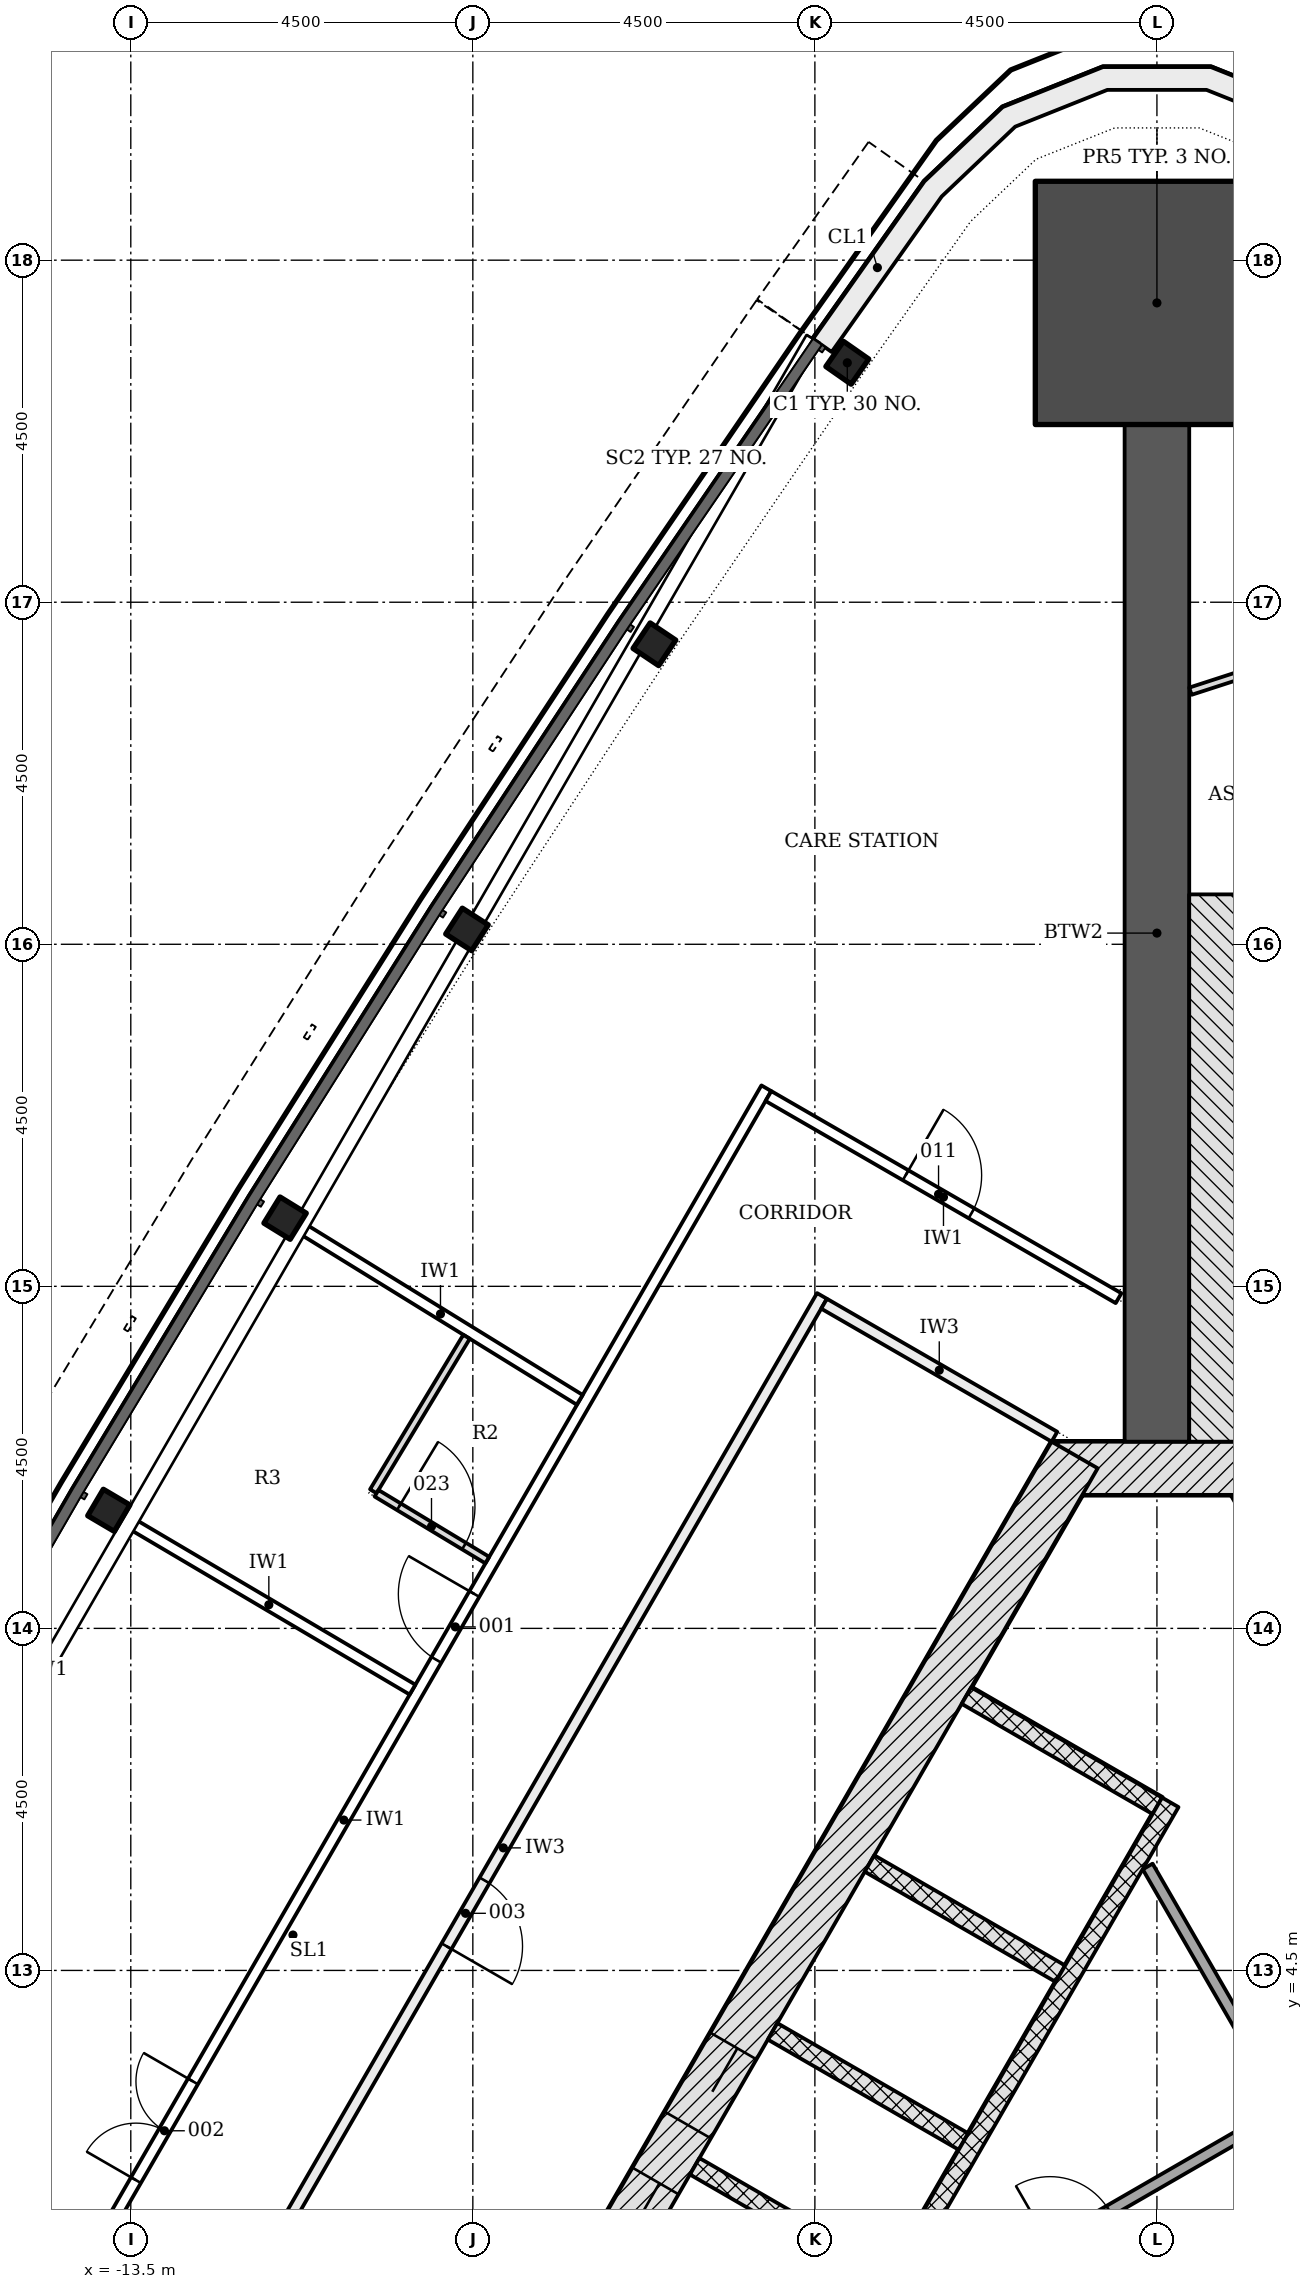
"""IFC4 building model, lengths in metres.
Left out: names, types, materials, properties, quantities, classifications, styles, units other than length and angle.
Written with IfcOpenShell. Run it as: python <this file> out.ifc"""

import sys

from ifc_helpers import new_model, si_unit, direction, frame, frame_2d, origin, origin_2d, place, context, subcontext, project, spatial, polyline, rectangle, i_section, outline, extrude, element, fill, save


model = new_model("IFC4")
c1 = context("Model", 3, precision=1e-05, world=origin(), true_north=direction((0.0, 1.0)))
c2 = subcontext(c1, "Body", "Model", "MODEL_VIEW")
j1 = project(units=[si_unit("LENGTHUNIT", "METRE"), si_unit("PLANEANGLEUNIT", "RADIAN")], contexts=[c1])
p1 = place(None, origin())
s1 = spatial("IfcSite", under=j1, at=p1, CompositionType="ELEMENT")
p2 = place(p1, origin())
s2 = spatial("IfcBuilding", under=s1, at=p2, CompositionType="ELEMENT")
p3 = place(p2, frame((0.0, 0.0, 69.0)))
s3 = spatial("IfcBuildingStorey", under=s2, at=p3, CompositionType="ELEMENT", Elevation=69.0)
p4 = place(p3, frame((10.311, -4.703, -0.2), z_axis=(0.0, 0.0, 1.0), x_axis=(-0.500001446645, 0.866024568562, 0.0)))
e1 = element("IfcWall", 1, at=p4, inside=s3, PredefinedType="SHEAR", context=c2, shape_type="SweptSolid", body=[
    extrude(rectangle(XDim=18.458, YDim=0.7, at=frame_2d((9.229, 0.0))), origin(), (0.0, 0.0, 1.0), 3.6),
])
p5 = place(p4, frame((9.5, 0.0, 0.2)))
e2 = element("IfcOpeningElement", 2, at=p5, cuts=e1, PredefinedType="OPENING", context=c2, shape_type="SweptSolid", body=[
    extrude(rectangle(XDim=1.0, YDim=2.1, at=frame_2d((0.5, 1.05))), frame((0.0, 0.36, 0.0), z_axis=(0.0, -1.0, 0.0), x_axis=(1.0, 0.0, 0.0)), (0.0, 0.0, 1.0), 0.72),
])
p6 = place(p4, frame((4.402, 0.0, 0.2)))
e3 = element("IfcOpeningElement", 3, at=p6, cuts=e1, PredefinedType="OPENING", context=c2, shape_type="SweptSolid", body=[
    extrude(rectangle(XDim=0.9, YDim=2.1, at=frame_2d((0.45, 1.05))), frame((0.0, 0.36, 0.0), z_axis=(0.0, -1.0, 0.0), x_axis=(1.0, 0.0, 0.0)), (0.0, 0.0, 1.0), 0.72),
])
p7 = place(p4, frame((13.927, 0.0, 0.2)))
e4 = element("IfcOpeningElement", 4, at=p7, cuts=e1, PredefinedType="OPENING", context=c2, shape_type="SweptSolid", body=[
    extrude(rectangle(XDim=0.9, YDim=2.1, at=frame_2d((0.45, 1.05))), frame((0.0, 0.36, 0.0), z_axis=(0.0, -1.0, 0.0), x_axis=(1.0, 0.0, 0.0)), (0.0, 0.0, 1.0), 0.72),
])
p8 = place(p3, frame((1.386, 11.106, -0.2), z_axis=(0.0, 0.0, 1.0), x_axis=(-1.0, 0.0, 0.0)))
e5 = element("IfcWall", 5, at=p8, inside=s3, PredefinedType="SHEAR", context=c2, shape_type="SweptSolid", body=[
    extrude(rectangle(XDim=2.771, YDim=0.7, at=frame_2d((1.386, 0.0))), origin(), (0.0, 0.0, 1.0), 3.6),
])
p9 = place(p3, frame((-1.083, 11.281, -0.2), z_axis=(0.0, 0.0, 1.0), x_axis=(-0.500001446645, -0.866024568562, 0.0)))
e6 = element("IfcWall", 6, at=p9, inside=s3, PredefinedType="SHEAR", context=c2, shape_type="SweptSolid", body=[
    extrude(rectangle(XDim=18.458, YDim=0.7, at=frame_2d((9.229, 0.0))), origin(), (0.0, 0.0, 1.0), 3.6),
])
p10 = place(p9, frame((8.979, 0.0, 0.2)))
e7 = element("IfcOpeningElement", 7, at=p10, cuts=e6, PredefinedType="OPENING", context=c2, shape_type="SweptSolid", body=[
    extrude(rectangle(XDim=1.2, YDim=2.1, at=frame_2d((0.6, 1.05))), frame((0.0, 0.36, 0.0), z_axis=(0.0, -1.0, 0.0), x_axis=(1.0, 0.0, 0.0)), (0.0, 0.0, 1.0), 0.72),
])
p11 = place(p9, frame((11.029, 0.0, 0.2)))
e8 = element("IfcOpeningElement", 8, at=p11, cuts=e6, PredefinedType="OPENING", context=c2, shape_type="SweptSolid", body=[
    extrude(rectangle(XDim=1.2, YDim=2.1, at=frame_2d((0.6, 1.05))), frame((0.0, 0.36, 0.0), z_axis=(0.0, -1.0, 0.0), x_axis=(1.0, 0.0, 0.0)), (0.0, 0.0, 1.0), 0.72),
])
p12 = place(p3, frame((0.0, 11.456, -0.2), z_axis=(0.0, 0.0, 1.0), x_axis=(0.0, 1.0, 0.0)))
e9 = element("IfcWall", 9, at=p12, inside=s3, PredefinedType="SHEAR", context=c2, shape_type="SweptSolid", body=[
    extrude(rectangle(XDim=13.382, YDim=0.85, at=frame_2d((6.691, 0.0))), origin(), (0.0, 0.0, 1.0), 3.6),
])
p13 = place(p3, frame((0.0, 26.438, -0.2), z_axis=(0.0, 0.0, 1.0), x_axis=(0.0, 1.0, 0.0)))
e10 = element("IfcColumn", 10, at=p13, inside=s3, PredefinedType="COLUMN", context=c2, shape_type="SweptSolid", body=[
    extrude(rectangle(XDim=3.2, YDim=3.2, at=origin_2d()), origin(), (0.0, 0.0, 1.0), 3.6),
])
for number, where, z_axis, x_axis in (
    (11, (-4.073, 25.65, -0.2), (0.0, 0.0, 1.0), (-0.573, -0.819, 0.0)),
    (12, (-6.611, 21.947, -0.2), (0.0, 0.0, 1.0), (-0.557, -0.83, 0.0)),
    (13, (-9.077, 18.195, -0.2), (0.0, 0.0, 1.0), (-0.541, -0.841, 0.0)),
    (14, (-11.47, 14.397, -0.2), (0.0, 0.0, 1.0), (-0.525, -0.851, 0.0)),
    (15, (-13.789, 10.553, -0.2), (0.0, 0.0, 1.0), (-0.508, -0.861, 0.0)),
):
    element("IfcColumn", number, at=place(p3, frame(where, z_axis=z_axis, x_axis=x_axis)), inside=s3, PredefinedType="COLUMN", context=c2, shape_type="SweptSolid", body=[
        extrude(i_section(OverallWidth=0.404, OverallDepth=0.406, WebThickness=0.027, FlangeThickness=0.044, FilletRadius=0.015, at=origin_2d()), origin(), (0.0, 0.0, 1.0), 3.6),
    ])
p14 = place(p3, origin())
e16 = element("IfcWall", 16, at=p14, inside=s3, PredefinedType="NOTDEFINED", context=c2, shape_type="SweptSolid", body=[
    extrude(outline(polyline([(4.524, 25.965), (3.059, 28.036), (2.029, 29.014), (0.71, 29.54), (-0.71, 29.54), (-2.029, 29.014), (-3.059, 28.036), (-4.524, 25.965), (-4.279, 25.792), (-2.831, 27.839), (-1.865, 28.757), (-0.652, 29.24), (0.652, 29.24), (1.865, 28.757), (2.831, 27.839), (4.279, 25.792), (4.524, 25.965)])), origin(), (0.0, 0.0, 1.0), 3.3),
])
p15 = place(p3, frame((-2.506, 8.115, -0.2), z_axis=(0.0, 0.0, 1.0), x_axis=(0.865996321171, -0.50005036918, 0.0)))
e17 = element("IfcWall", 17, at=p15, inside=s3, PredefinedType="PARTITIONING", context=c2, shape_type="SweptSolid", body=[
    extrude(rectangle(XDim=2.9, YDim=0.25, at=frame_2d((1.45, 0.0))), origin(), (0.0, 0.0, 1.0), 3.6),
])
for number, where, z_axis, x_axis in (
    (18, (-3.781, 5.907, -0.2), (0.0, 0.0, 1.0), (0.866, -0.5, 0.0)),
    (19, (-5.056, 3.699, -0.2), (0.0, 0.0, 1.0), (0.866, -0.5, 0.0)),
    (20, (-6.081, 1.923, -0.2), (0.0, 0.0, 1.0), (0.866, -0.5, 0.0)),
):
    element("IfcWall", number, at=place(p3, frame(where, z_axis=z_axis, x_axis=x_axis)), inside=s3, PredefinedType="PARTITIONING", context=c2, shape_type="SweptSolid", body=[
        extrude(rectangle(XDim=2.9, YDim=0.25, at=frame_2d((1.45, 0.0))), origin(), (0.0, 0.0, 1.0), 3.6),
    ])
p16 = place(p3, frame((0.176, 6.711, 0.0), z_axis=(0.0, 0.0, 1.0), x_axis=(-0.500004227369, -0.866022963098, 0.0)))
e21 = element("IfcWall", 21, at=p16, inside=s3, PredefinedType="PARTITIONING", context=c2, shape_type="SweptSolid", body=[
    extrude(rectangle(XDim=11.8, YDim=0.25, at=frame_2d((5.9, 0.0))), origin(), (0.0, 0.0, 1.0), 3.4),
])
p17 = place(p3, frame((-5.148, -2.89, 0.0), z_axis=(0.0, 0.0, 1.0), x_axis=(0.866030081544, 0.499991897794, 0.0)))
e22 = element("IfcWall", 22, at=p17, inside=s3, PredefinedType="PARTITIONING", context=c2, shape_type="SweptSolid", body=[
    extrude(rectangle(XDim=12.131, YDim=0.15, at=frame_2d((6.065, 0.0))), origin(), (0.0, 0.0, 1.0), 3.4),
])
p18 = place(p17, frame((5.831, 0.0, 0.0)))
e23 = element("IfcOpeningElement", 23, at=p18, cuts=e22, PredefinedType="OPENING", context=c2, shape_type="SweptSolid", body=[
    extrude(rectangle(XDim=0.9, YDim=2.1, at=frame_2d((0.45, 1.05))), frame((0.0, 0.085, 0.0), z_axis=(0.0, -1.0, 0.0), x_axis=(1.0, 0.0, 0.0)), (0.0, 0.0, 1.0), 0.17),
])
p19 = place(p17, frame((1.467, 0.0, 0.0)))
e24 = element("IfcOpeningElement", 24, at=p19, cuts=e22, PredefinedType="OPENING", context=c2, shape_type="SweptSolid", body=[
    extrude(rectangle(XDim=0.9, YDim=2.1, at=frame_2d((0.45, 1.05))), frame((0.0, 0.085, 0.0), z_axis=(0.0, -1.0, 0.0), x_axis=(1.0, 0.0, 0.0)), (0.0, 0.0, 1.0), 0.17),
])
p20 = place(p3, frame((-3.748, -0.465, 0.0), z_axis=(0.0, 0.0, 1.0), x_axis=(0.866033540873, 0.499985905884, 0.0)))
e25 = element("IfcWall", 25, at=p20, inside=s3, PredefinedType="PARTITIONING", context=c2, shape_type="SweptSolid", body=[
    extrude(rectangle(XDim=9.706, YDim=0.15, at=frame_2d((4.853, 0.0))), origin(), (0.0, 0.0, 1.0), 3.4),
])
p21 = place(p20, frame((2.704, 0.0, 0.0)))
e26 = element("IfcOpeningElement", 26, at=p21, cuts=e25, PredefinedType="OPENING", context=c2, shape_type="SweptSolid", body=[
    extrude(rectangle(XDim=0.9, YDim=2.1, at=frame_2d((0.45, 1.05))), frame((0.0, 0.085, 0.0), z_axis=(0.0, -1.0, 0.0), x_axis=(1.0, 0.0, 0.0)), (0.0, 0.0, 1.0), 0.17),
])
p22 = place(p3, frame((1.526, 3.013, 0.0), z_axis=(0.0, 0.0, 1.0), x_axis=(-0.499978925887, 0.866037570588, 0.0)))
e27 = element("IfcWall", 27, at=p22, inside=s3, PredefinedType="PARTITIONING", context=c2, shape_type="SweptSolid", body=[
    extrude(rectangle(XDim=3.296, YDim=0.15, at=frame_2d((1.648, 0.0))), origin(), (0.0, 0.0, 1.0), 3.4),
])
p23 = place(p3, frame((1.005, 11.456, -0.2), z_axis=(0.0, 0.0, 1.0), x_axis=(0.0, 1.0, 0.0)))
e28 = element("IfcWall", 28, at=p23, inside=s3, PredefinedType="SHEAR", context=c2, shape_type="SweptSolid", body=[
    extrude(rectangle(XDim=7.2, YDim=1.161, at=frame_2d((3.6, 0.0))), origin(), (0.0, 0.0, 1.0), 3.6),
])
p24 = place(p3, frame((-16.256, -3.149, 0.0), z_axis=(0.0, 0.0, 1.0), x_axis=(0.499999683919, 0.866025586274, 0.0)))
e29 = element("IfcWall", 29, at=p24, inside=s3, PredefinedType="PARTITIONING", context=c2, shape_type="SweptSolid", body=[
    extrude(rectangle(XDim=22.234, YDim=0.15, at=frame_2d((11.117, 0.0))), origin(), (0.0, 0.0, 1.0), 2.778),
])
p25 = place(p24, frame((13.551, 0.0, 0.0)))
e30 = element("IfcOpeningElement", 30, at=p25, cuts=e29, PredefinedType="OPENING", context=c2, shape_type="SweptSolid", body=[
    extrude(rectangle(XDim=1.0, YDim=2.1, at=frame_2d((0.5, 1.05))), frame((0.0, 0.085, 0.0), z_axis=(0.0, -1.0, 0.0), x_axis=(1.0, 0.0, 0.0)), (0.0, 0.0, 1.0), 0.17),
])
p26 = place(p24, frame((5.647, 0.0, 0.0)))
e31 = element("IfcOpeningElement", 31, at=p26, cuts=e29, PredefinedType="OPENING", context=c2, shape_type="SweptSolid", body=[
    extrude(rectangle(XDim=1.5, YDim=2.1, at=frame_2d((0.75, 1.05))), frame((0.0, 0.085, 0.0), z_axis=(0.0, -1.0, 0.0), x_axis=(1.0, 0.0, 0.0)), (0.0, 0.0, 1.0), 0.17),
])
p27 = place(p3, frame((-4.407, 13.374, 0.0), z_axis=(0.0, 0.0, 1.0), x_axis=(-0.499997181693, -0.866027030928, 0.0)))
e32 = element("IfcWall", 32, at=p27, inside=s3, PredefinedType="PARTITIONING", context=c2, shape_type="SweptSolid", body=[
    extrude(rectangle(XDim=16.77, YDim=0.15, at=frame_2d((8.385, 0.0))), origin(), (0.0, 0.0, 1.0), 2.778),
])
p28 = place(p27, frame((8.879, 0.0, 0.0)))
e33 = element("IfcOpeningElement", 33, at=p28, cuts=e32, PredefinedType="OPENING", context=c2, shape_type="SweptSolid", body=[
    extrude(rectangle(XDim=1.0, YDim=2.1, at=frame_2d((0.5, 1.05))), frame((0.0, 0.085, 0.0), z_axis=(0.0, -1.0, 0.0), x_axis=(1.0, 0.0, 0.0)), (0.0, 0.0, 1.0), 0.17),
])
p29 = place(p3, frame((-5.111, 16.003, 0.0), z_axis=(0.0, 0.0, 1.0), x_axis=(0.866034245675, -0.499984685083, 0.0)))
e34 = element("IfcWall", 34, at=p29, inside=s3, PredefinedType="PARTITIONING", context=c2, shape_type="SweptSolid", body=[
    extrude(rectangle(XDim=5.319, YDim=0.15, at=frame_2d((2.66, 0.0))), origin(), (0.0, 0.0, 1.0), 3.4),
])
p30 = place(p29, frame((2.084, 0.0, 0.0)))
e35 = element("IfcOpeningElement", 35, at=p30, cuts=e34, PredefinedType="OPENING", context=c2, shape_type="SweptSolid", body=[
    extrude(rectangle(XDim=1.0, YDim=2.1, at=frame_2d((0.5, 1.05))), frame((0.0, 0.085, 0.0), z_axis=(0.0, -1.0, 0.0), x_axis=(1.0, 0.0, 0.0)), (0.0, 0.0, 1.0), 0.17),
])
p31 = place(p3, frame((-4.379, 13.271, 0.0), z_axis=(0.0, 0.0, 1.0), x_axis=(0.866019471182, -0.500010275428, 0.0)))
e36 = element("IfcWall", 36, at=p31, inside=s3, PredefinedType="PARTITIONING", context=c2, shape_type="SweptSolid", body=[
    extrude(rectangle(XDim=3.5, YDim=0.15, at=frame_2d((1.75, 0.0))), origin(), (0.0, 0.0, 1.0), 3.4),
])
p32 = place(p3, frame((-13.574, 10.426, 0.0), z_axis=(0.0, 0.0, 1.0), x_axis=(0.861161165873, -0.508332023772, 0.0)))
e37 = element("IfcWall", 37, at=p32, inside=s3, PredefinedType="PARTITIONING", context=c2, shape_type="SweptSolid", body=[
    extrude(rectangle(XDim=4.39, YDim=0.15, at=frame_2d((2.195, 0.0))), origin(), (0.0, 0.0, 1.0), 2.778),
])
p33 = place(p3, frame((-11.257, 14.266, 0.0), z_axis=(0.0, 0.0, 1.0), x_axis=(0.851192414307, -0.524853764231, 0.0)))
e38 = element("IfcWall", 38, at=p33, inside=s3, PredefinedType="PARTITIONING", context=c2, shape_type="SweptSolid", body=[
    extrude(rectangle(XDim=4.303, YDim=0.15, at=frame_2d((2.152, 0.0))), origin(), (0.0, 0.0, 1.0), 2.778),
])
p34 = place(p3, frame((0.44, 21.329, 0.0), z_axis=(0.0, 0.0, 1.0), x_axis=(0.951171830883, 0.308661866992, 0.0)))
e39 = element("IfcWall", 39, at=p34, inside=s3, PredefinedType="PARTITIONING", context=c2, shape_type="SweptSolid", body=[
    extrude(rectangle(XDim=6.078, YDim=0.1, at=frame_2d((3.039, 0.0))), origin(), (0.0, 0.0, 1.0), 2.974),
])
p35 = place(p34, frame((2.197, 0.0, 0.0)))
e40 = element("IfcOpeningElement", 40, at=p35, cuts=e39, PredefinedType="OPENING", context=c2, shape_type="SweptSolid", body=[
    extrude(rectangle(XDim=1.0, YDim=2.1, at=frame_2d((0.5, 1.05))), frame((0.0, 0.06, 0.0), z_axis=(0.0, -1.0, 0.0), x_axis=(1.0, 0.0, 0.0)), (0.0, 0.0, 1.0), 0.12),
])
p36 = place(p3, frame((-9.083, 12.836, 0.0), z_axis=(0.0, 0.0, 1.0), x_axis=(-0.516596087141, -0.856229223252, 0.0)))
e41 = element("IfcWall", 41, at=p36, inside=s3, PredefinedType="PARTITIONING", context=c2, shape_type="SweptSolid", body=[
    extrude(rectangle(XDim=2.374, YDim=0.1, at=frame_2d((1.187, 0.0))), origin(), (0.0, 0.0, 1.0), 2.778),
])
p37 = place(p3, frame((-10.267, 10.778, 0.0), z_axis=(0.0, 0.0, 1.0), x_axis=(0.856198606516, -0.516646829275, 0.0)))
e42 = element("IfcWall", 42, at=p37, inside=s3, PredefinedType="PARTITIONING", context=c2, shape_type="SweptSolid", body=[
    extrude(rectangle(XDim=1.701, YDim=0.1, at=frame_2d((0.851, 0.0))), origin(), (0.0, 0.0, 1.0), 3.4),
])
p38 = place(p37, frame((0.344, 0.0, 0.0)))
e43 = element("IfcOpeningElement", 43, at=p38, cuts=e42, PredefinedType="OPENING", context=c2, shape_type="SweptSolid", body=[
    extrude(rectangle(XDim=1.0, YDim=2.1, at=frame_2d((0.5, 1.05))), frame((0.0, 0.06, 0.0), z_axis=(0.0, -1.0, 0.0), x_axis=(1.0, 0.0, 0.0)), (0.0, 0.0, 1.0), 0.12),
])
p39 = place(p10, origin())
e44 = element("IfcDoor", 44, at=p39, inside=s3, OperationType="DOUBLE_DOOR_SLIDING", PredefinedType="DOOR", context=c2, shape_type="SweptSolid", body=[
    extrude(rectangle(XDim=1.2, YDim=2.1, at=frame_2d((0.6, 1.05))), frame((0.0, 0.025, 0.0), z_axis=(0.0, -1.0, 0.0), x_axis=(1.0, 0.0, 0.0)), (0.0, 0.0, 1.0), 0.05),
])
fill(e7, e44)
p40 = place(p11, origin())
e45 = element("IfcDoor", 45, at=p40, inside=s3, OperationType="DOUBLE_DOOR_SLIDING", PredefinedType="DOOR", context=c2, shape_type="SweptSolid", body=[
    extrude(rectangle(XDim=1.2, YDim=2.1, at=frame_2d((0.6, 1.05))), frame((0.0, 0.025, 0.0), z_axis=(0.0, -1.0, 0.0), x_axis=(1.0, 0.0, 0.0)), (0.0, 0.0, 1.0), 0.05),
])
fill(e8, e45)
p41 = place(p21, origin())
e46 = element("IfcDoor", 46, at=p41, inside=s3, OperationType="SINGLE_SWING_LEFT", PredefinedType="DOOR", context=c2, shape_type="SweptSolid", body=[
    extrude(rectangle(XDim=0.9, YDim=2.1, at=frame_2d((0.45, 1.05))), frame((0.0, 0.025, 0.0), z_axis=(0.0, -1.0, 0.0), x_axis=(1.0, 0.0, 0.0)), (0.0, 0.0, 1.0), 0.05),
])
fill(e26, e46)
p42 = place(p25, origin())
e47 = element("IfcDoor", 47, at=p42, inside=s3, OperationType="SINGLE_SWING_RIGHT", PredefinedType="DOOR", context=c2, shape_type="SweptSolid", body=[
    extrude(rectangle(XDim=1.0, YDim=2.1, at=frame_2d((0.5, 1.05))), frame((0.0, 0.025, 0.0), z_axis=(0.0, -1.0, 0.0), x_axis=(1.0, 0.0, 0.0)), (0.0, 0.0, 1.0), 0.05),
])
fill(e30, e47)
p43 = place(p26, origin())
e48 = element("IfcDoor", 48, at=p43, inside=s3, OperationType="DOUBLE_DOOR_SINGLE_SWING", PredefinedType="DOOR", context=c2, shape_type="SweptSolid", body=[
    extrude(rectangle(XDim=1.5, YDim=2.1, at=frame_2d((0.75, 1.05))), frame((0.0, 0.025, 0.0), z_axis=(0.0, -1.0, 0.0), x_axis=(1.0, 0.0, 0.0)), (0.0, 0.0, 1.0), 0.05),
])
fill(e31, e48)
p44 = place(p28, origin())
e49 = element("IfcDoor", 49, at=p44, inside=s3, OperationType="SINGLE_SWING_RIGHT", PredefinedType="DOOR", context=c2, shape_type="SweptSolid", body=[
    extrude(rectangle(XDim=1.0, YDim=2.1, at=frame_2d((0.5, 1.05))), frame((0.0, 0.025, 0.0), z_axis=(0.0, -1.0, 0.0), x_axis=(1.0, 0.0, 0.0)), (0.0, 0.0, 1.0), 0.05),
])
fill(e33, e49)
p45 = place(p30, origin())
e50 = element("IfcDoor", 50, at=p45, inside=s3, OperationType="SINGLE_SWING_LEFT", PredefinedType="DOOR", context=c2, shape_type="SweptSolid", body=[
    extrude(rectangle(XDim=1.0, YDim=2.1, at=frame_2d((0.5, 1.05))), frame((0.0, 0.025, 0.0), z_axis=(0.0, -1.0, 0.0), x_axis=(1.0, 0.0, 0.0)), (0.0, 0.0, 1.0), 0.05),
])
fill(e35, e50)
p46 = place(p38, origin())
e51 = element("IfcDoor", 51, at=p46, inside=s3, OperationType="SINGLE_SWING_LEFT", PredefinedType="DOOR", context=c2, shape_type="SweptSolid", body=[
    extrude(rectangle(XDim=1.0, YDim=2.1, at=frame_2d((0.5, 1.05))), frame((0.0, 0.025, 0.0), z_axis=(0.0, -1.0, 0.0), x_axis=(1.0, 0.0, 0.0)), (0.0, 0.0, 1.0), 0.05),
])
fill(e43, e51)
save(model, sys.argv[1])
